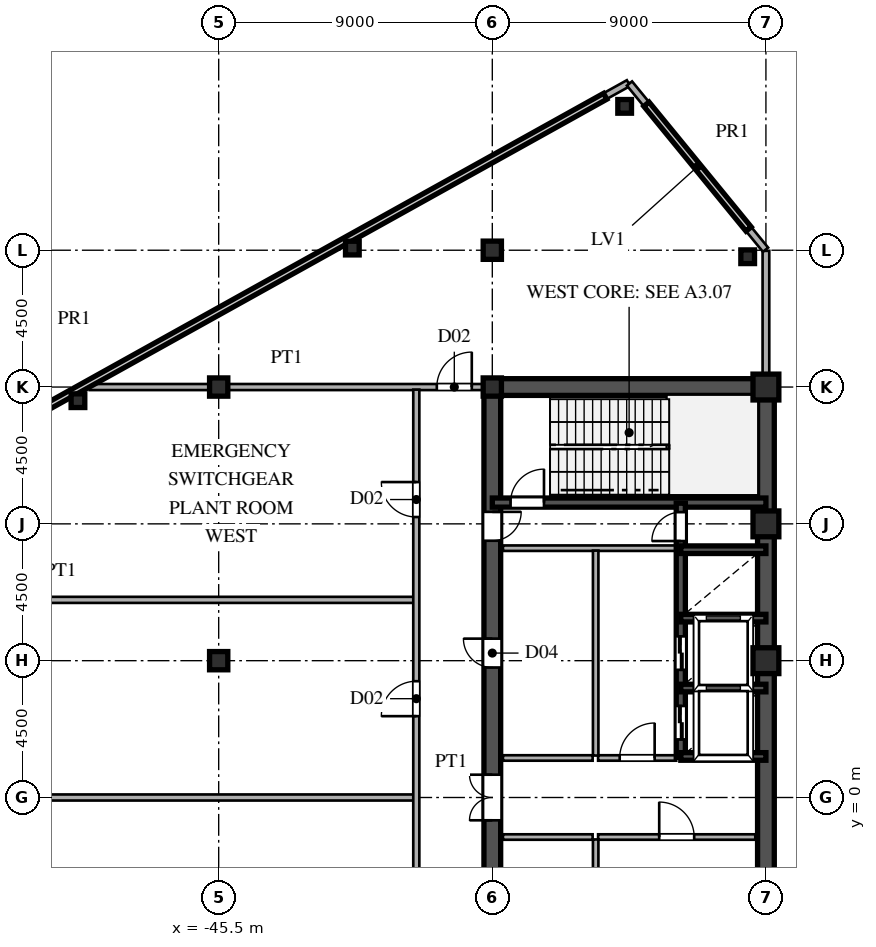
"""IFC4 building model, lengths in metres.
Left out: names, types, materials, properties, quantities, classifications, styles, units other than length and angle.
Written with IfcOpenShell. Run it as: python <this file> out.ifc"""

import sys

from ifc_helpers import new_model, si_unit, direction, frame, frame_2d, origin, origin_2d, place, context, subcontext, project, spatial, rectangle, hollow_rectangle, i_section, extrude, source, transform, mapped, element, fill, save


model = new_model("IFC4")
c1 = context("Model", 3, precision=1e-05, world=origin(), true_north=direction((0.0, 1.0)))
c2 = subcontext(c1, "Body", "Model", "MODEL_VIEW")
j1 = project(units=[si_unit("LENGTHUNIT", "METRE"), si_unit("PLANEANGLEUNIT", "RADIAN")], contexts=[c1])
p1 = place(None, origin())
s1 = spatial("IfcSite", under=j1, at=p1, CompositionType="ELEMENT")
p2 = place(p1, origin())
s2 = spatial("IfcBuilding", under=s1, at=p2, CompositionType="ELEMENT")
p3 = place(p2, frame((0.0, 0.0, 162.0)))
s3 = spatial("IfcBuildingStorey", under=s2, at=p3, CompositionType="ELEMENT", Elevation=162.0)
m1 = source(origin(), c2, "Body", "SweptSolid", [
    extrude(hollow_rectangle(XDim=0.85, YDim=0.85, WallThickness=0.036, at=origin_2d()), origin(), (0.0, 0.0, 1.0), 5.1),
])
for number, where, z_axis, x_axis in (
    (1, (-27.5, 4.5, 0.0), (0.0, 0.0, 1.0), (1.0, 0.0, 0.0)),
    (2, (-27.5, 9.0, 0.0), (0.0, 0.0, 1.0), (1.0, 0.0, 0.0)),
    (3, (-27.5, 13.5, 0.0), (0.0, 0.0, 1.0), (1.0, 0.0, 0.0)),
):
    element("IfcColumn", number, at=place(p3, frame(where, z_axis=z_axis, x_axis=x_axis)), inside=s3, PredefinedType="COLUMN", context=c2, shape_type="MappedRepresentation", body=[
        mapped(m1, transform((0.0, 0.0, 0.0), scale=1.0)),
    ])
m2 = source(origin(), c2, "Body", "SweptSolid", [
    extrude(i_section(OverallWidth=0.6, OverallDepth=0.6, WebThickness=0.025, FlangeThickness=0.04, at=origin_2d()), origin(), (0.0, 0.0, 1.0), 5.1),
])
for number, where, z_axis, x_axis in (
    (4, (-36.5, 13.5, 0.0), (0.0, 0.0, 1.0), (1.0, 0.0, 0.0)),
    (5, (-36.5, 18.0, 0.0), (0.0, 0.0, 1.0), (1.0, 0.0, 0.0)),
    (6, (-45.5, 4.5, 0.0), (0.0, 0.0, 1.0), (1.0, 0.0, 0.0)),
    (7, (-45.5, 13.5, 0.0), (0.0, 0.0, 1.0), (1.0, 0.0, 0.0)),
):
    element("IfcColumn", number, at=place(p3, frame(where, z_axis=z_axis, x_axis=x_axis)), inside=s3, PredefinedType="COLUMN", context=c2, shape_type="MappedRepresentation", body=[
        mapped(m2, transform((0.0, 0.0, 0.0), scale=1.0)),
    ])
m3 = source(origin(), c2, "Body", "SweptSolid", [
    extrude(hollow_rectangle(XDim=0.45, YDim=0.45, WallThickness=0.018, at=origin_2d()), origin(), (0.0, 0.0, 1.0), 5.1),
])
for number, where, z_axis, x_axis in (
    (8, (-28.1, 17.786, 0.0), (0.0, 0.0, 1.0), (1.0, 0.0, 0.0)),
    (9, (-32.147, 22.732, 0.0), (0.0, 0.0, 1.0), (1.0, 0.0, 0.0)),
    (10, (-41.104, 18.071, 0.0), (0.0, 0.0, 1.0), (1.0, 0.0, 0.0)),
    (11, (-50.129, 13.051, 0.0), (0.0, 0.0, 1.0), (1.0, 0.0, 0.0)),
):
    element("IfcColumn", number, at=place(p3, frame(where, z_axis=z_axis, x_axis=x_axis)), inside=s3, PredefinedType="COLUMN", context=c2, shape_type="MappedRepresentation", body=[
        mapped(m3, transform((0.0, 0.0, 0.0), scale=1.0)),
    ])
p4 = place(p3, frame((-27.5, 13.52, 0.0), z_axis=(0.0, 0.0, 1.0), x_axis=(0.0, 1.0, 0.0)))
e12 = element("IfcWall", 12, at=p4, inside=s3, PredefinedType="PARAPET", context=c2, shape_type="SweptSolid", body=[
    extrude(rectangle(XDim=4.46, YDim=0.22, at=frame_2d((2.23, 0.0))), origin(), (0.0, 0.0, 1.0), 1.25),
])
p5 = place(p3, frame((-27.513, 18.015, 0.0), z_axis=(0.0, 0.0, 1.0), x_axis=(-0.633218976113, 0.773972692213, 0.0)))
e13 = element("IfcWall", 13, at=p5, inside=s3, PredefinedType="PARAPET", context=c2, shape_type="SweptSolid", body=[
    extrude(rectangle(XDim=7.066, YDim=0.22, at=frame_2d((3.533, 0.0))), origin(), (0.0, 0.0, 1.0), 1.25),
])
p6 = place(p3, frame((-32.018, 23.49, 0.0), z_axis=(0.0, 0.0, 1.0), x_axis=(-0.873930586172, -0.486050748947, 0.0)))
e14 = element("IfcWall", 14, at=p6, inside=s3, PredefinedType="PARAPET", context=c2, shape_type="SweptSolid", body=[
    extrude(rectangle(XDim=41.725, YDim=0.22, at=frame_2d((20.863, 0.0))), origin(), (0.0, 0.0, 1.0), 1.25),
])
for number, where, z_axis, x_axis in (
    (15, (-27.5, -13.5, 0.0), (0.0, 0.0, 1.0), (0.0, 1.0, 0.0)),
    (16, (-27.5, 1.3, 0.0), (0.0, 0.0, 1.0), (0.0, 1.0, 0.0)),
):
    element("IfcWall", number, at=place(p3, frame(where, z_axis=z_axis, x_axis=x_axis)), inside=s3, PredefinedType="SHEAR", context=c2, shape_type="SweptSolid", body=[
        extrude(rectangle(XDim=12.2, YDim=0.55, at=frame_2d((6.1, 0.0))), origin(), (0.0, 0.0, 1.0), 4.88),
    ])
p7 = place(p3, frame((-27.5, -1.3, 0.0), z_axis=(0.0, 0.0, 1.0), x_axis=(0.0, 1.0, 0.0)))
e17 = element("IfcWall", 17, at=p7, inside=s3, PredefinedType="SHEAR", context=c2, shape_type="SweptSolid", body=[
    extrude(rectangle(XDim=2.6, YDim=0.55, at=frame_2d((1.3, 0.0))), origin(), (0.0, 0.0, 1.0), 4.88),
])
p8 = place(p3, frame((-36.5, 13.5, 0.0), z_axis=(0.0, 0.0, 1.0), x_axis=(1.0, 0.0, 0.0)))
e18 = element("IfcWall", 18, at=p8, inside=s3, PredefinedType="SHEAR", context=c2, shape_type="SweptSolid", body=[
    extrude(rectangle(XDim=9.0, YDim=0.55, at=frame_2d((4.5, 0.0))), origin(), (0.0, 0.0, 1.0), 4.88),
])
p9 = place(p3, frame((-36.5, -1.3, 0.0), z_axis=(0.0, 0.0, 1.0), x_axis=(0.0, 1.0, 0.0)))
e19 = element("IfcWall", 19, at=p9, inside=s3, PredefinedType="SHEAR", context=c2, shape_type="SweptSolid", body=[
    extrude(rectangle(XDim=2.6, YDim=0.55, at=frame_2d((1.3, 0.0))), origin(), (0.0, 0.0, 1.0), 4.88),
])
p10 = place(p9, frame((0.55, 0.0, 0.0)))
e20 = element("IfcOpeningElement", 20, at=p10, cuts=e19, PredefinedType="OPENING", context=c2, shape_type="SweptSolid", body=[
    extrude(rectangle(XDim=1.5, YDim=2.3, at=frame_2d((0.75, 1.15))), frame((0.0, 0.285, 0.0), z_axis=(0.0, -1.0, 0.0), x_axis=(1.0, 0.0, 0.0)), (0.0, 0.0, 1.0), 0.57),
])
p11 = place(p3, frame((-36.5, 8.2, 0.0), z_axis=(0.0, 0.0, 1.0), x_axis=(0.0, 1.0, 0.0)))
e21 = element("IfcWall", 21, at=p11, inside=s3, PredefinedType="SHEAR", context=c2, shape_type="SweptSolid", body=[
    extrude(rectangle(XDim=5.45, YDim=0.55, at=frame_2d((2.725, 0.0))), origin(), (0.0, 0.0, 1.0), 4.88),
])
p12 = place(p11, frame((0.245, 0.0, 0.0)))
e22 = element("IfcOpeningElement", 22, at=p12, cuts=e21, PredefinedType="OPENING", context=c2, shape_type="SweptSolid", body=[
    extrude(rectangle(XDim=0.95, YDim=2.15, at=frame_2d((0.475, 1.075))), frame((0.0, 0.285, 0.0), z_axis=(0.0, -1.0, 0.0), x_axis=(1.0, 0.0, 0.0)), (0.0, 0.0, 1.0), 0.57),
])
p13 = place(p3, frame((-36.5, -6.5, 0.0), z_axis=(0.0, 0.0, 1.0), x_axis=(0.0, 1.0, 0.0)))
e23 = element("IfcWall", 23, at=p13, inside=s3, PredefinedType="SHEAR", context=c2, shape_type="SweptSolid", body=[
    extrude(rectangle(XDim=5.2, YDim=0.55, at=frame_2d((2.6, 0.0))), origin(), (0.0, 0.0, 1.0), 4.88),
])
p14 = place(p13, frame((2.125, 0.0, 0.0)))
e24 = element("IfcOpeningElement", 24, at=p14, cuts=e23, PredefinedType="OPENING", context=c2, shape_type="SweptSolid", body=[
    extrude(rectangle(XDim=0.95, YDim=2.15, at=frame_2d((0.475, 1.075))), frame((0.0, 0.285, 0.0), z_axis=(0.0, -1.0, 0.0), x_axis=(1.0, 0.0, 0.0)), (0.0, 0.0, 1.0), 0.57),
])
p15 = place(p3, frame((-36.5, 1.3, 0.0), z_axis=(0.0, 0.0, 1.0), x_axis=(0.0, 1.0, 0.0)))
e25 = element("IfcWall", 25, at=p15, inside=s3, PredefinedType="SHEAR", context=c2, shape_type="SweptSolid", body=[
    extrude(rectangle(XDim=6.9, YDim=0.55, at=frame_2d((3.45, 0.0))), origin(), (0.0, 0.0, 1.0), 4.88),
])
p16 = place(p15, frame((2.975, 0.0, 0.0)))
e26 = element("IfcOpeningElement", 26, at=p16, cuts=e25, PredefinedType="OPENING", context=c2, shape_type="SweptSolid", body=[
    extrude(rectangle(XDim=0.95, YDim=2.15, at=frame_2d((0.475, 1.075))), frame((0.0, 0.285, 0.0), z_axis=(0.0, -1.0, 0.0), x_axis=(1.0, 0.0, 0.0)), (0.0, 0.0, 1.0), 0.57),
])
p17 = place(p3, frame((-36.5, 9.7, 0.0), z_axis=(0.0, 0.0, 1.0), x_axis=(1.0, 0.0, 0.0)))
e27 = element("IfcWall", 27, at=p17, inside=s3, PredefinedType="SHEAR", context=c2, shape_type="SweptSolid", body=[
    extrude(rectangle(XDim=9.0, YDim=0.3, at=frame_2d((4.5, 0.0))), origin(), (0.0, 0.0, 1.0), 4.88),
])
p18 = place(p17, frame((0.6, 0.0, 0.0)))
e28 = element("IfcOpeningElement", 28, at=p18, cuts=e27, PredefinedType="OPENING", context=c2, shape_type="SweptSolid", body=[
    extrude(rectangle(XDim=1.1, YDim=2.2, at=frame_2d((0.55, 1.1))), frame((0.0, 0.16, 0.0), z_axis=(0.0, -1.0, 0.0), x_axis=(1.0, 0.0, 0.0)), (0.0, 0.0, 1.0), 0.32),
])
for number, where, z_axis, x_axis in (
    (29, (-30.3, 1.35, 0.0), (0.0, 0.0, 1.0), (1.0, 0.0, 0.0)),
    (30, (-30.3, 3.6, 0.0), (0.0, 0.0, 1.0), (1.0, 0.0, 0.0)),
    (31, (-30.3, 5.9, 0.0), (0.0, 0.0, 1.0), (1.0, 0.0, 0.0)),
    (32, (-30.3, 8.15, 0.0), (0.0, 0.0, 1.0), (1.0, 0.0, 0.0)),
):
    element("IfcWall", number, at=place(p3, frame(where, z_axis=z_axis, x_axis=x_axis)), inside=s3, PredefinedType="SHEAR", context=c2, shape_type="SweptSolid", body=[
        extrude(rectangle(XDim=2.8, YDim=0.25, at=frame_2d((1.4, 0.0))), origin(), (0.0, 0.0, 1.0), 4.88),
    ])
p19 = place(p3, frame((-30.3, 1.32, 0.0), z_axis=(0.0, 0.0, 1.0), x_axis=(0.0, 1.0, 0.0)))
e33 = element("IfcWall", 33, at=p19, inside=s3, PredefinedType="SHEAR", context=c2, shape_type="SweptSolid", body=[
    extrude(rectangle(XDim=2.28, YDim=0.3, at=frame_2d((1.14, 0.0))), origin(), (0.0, 0.0, 1.0), 4.88),
])
p20 = place(p19, frame((0.59, 0.0, 0.0)))
e34 = element("IfcOpeningElement", 34, at=p20, cuts=e33, PredefinedType="OPENING", context=c2, shape_type="SweptSolid", body=[
    extrude(rectangle(XDim=1.1, YDim=2.2, at=frame_2d((0.55, 1.1))), frame((0.0, 0.16, 0.0), z_axis=(0.0, -1.0, 0.0), x_axis=(1.0, 0.0, 0.0)), (0.0, 0.0, 1.0), 0.32),
])
p21 = place(p3, frame((-30.3, 3.6, 0.0), z_axis=(0.0, 0.0, 1.0), x_axis=(0.0, 1.0, 0.0)))
e35 = element("IfcWall", 35, at=p21, inside=s3, PredefinedType="SHEAR", context=c2, shape_type="SweptSolid", body=[
    extrude(rectangle(XDim=2.3, YDim=0.3, at=frame_2d((1.15, 0.0))), origin(), (0.0, 0.0, 1.0), 4.88),
])
p22 = place(p21, frame((0.6, 0.0, 0.0)))
e36 = element("IfcOpeningElement", 36, at=p22, cuts=e35, PredefinedType="OPENING", context=c2, shape_type="SweptSolid", body=[
    extrude(rectangle(XDim=1.1, YDim=2.2, at=frame_2d((0.55, 1.1))), frame((0.0, 0.16, 0.0), z_axis=(0.0, -1.0, 0.0), x_axis=(1.0, 0.0, 0.0)), (0.0, 0.0, 1.0), 0.32),
])
p23 = place(p3, frame((-30.3, 5.9, 0.0), z_axis=(0.0, 0.0, 1.0), x_axis=(0.0, 1.0, 0.0)))
e37 = element("IfcWall", 37, at=p23, inside=s3, PredefinedType="SHEAR", context=c2, shape_type="SweptSolid", body=[
    extrude(rectangle(XDim=2.25, YDim=0.3, at=frame_2d((1.125, 0.0))), origin(), (0.0, 0.0, 1.0), 4.88),
])
p24 = place(p3, frame((-30.3, 8.15, 0.0), z_axis=(0.0, 0.0, 1.0), x_axis=(0.0, 1.0, 0.0)))
e38 = element("IfcWall", 38, at=p24, inside=s3, PredefinedType="SHEAR", context=c2, shape_type="SweptSolid", body=[
    extrude(rectangle(XDim=1.53, YDim=0.3, at=frame_2d((0.765, 0.0))), origin(), (0.0, 0.0, 1.0), 4.88),
])
p25 = place(p24, frame((0.285, 0.0, 0.0)))
e39 = element("IfcOpeningElement", 39, at=p25, cuts=e38, PredefinedType="OPENING", context=c2, shape_type="SweptSolid", body=[
    extrude(rectangle(XDim=0.95, YDim=2.15, at=frame_2d((0.475, 1.075))), frame((0.0, 0.16, 0.0), z_axis=(0.0, -1.0, 0.0), x_axis=(1.0, 0.0, 0.0)), (0.0, 0.0, 1.0), 0.32),
])
p26 = place(p3, frame((-36.15, 8.2, 0.0), z_axis=(0.0, 0.0, 1.0), x_axis=(1.0, 0.0, 0.0)))
e40 = element("IfcWall", 40, at=p26, inside=s3, PredefinedType="PARTITIONING", context=c2, shape_type="SweptSolid", body=[
    extrude(rectangle(XDim=5.7, YDim=0.18, at=frame_2d((2.85, 0.0))), origin(), (0.0, 0.0, 1.0), 4.88),
])
p27 = place(p3, frame((-33.1, -6.42, 0.0), z_axis=(0.0, 0.0, 1.0), x_axis=(0.0, 1.0, 0.0)))
e41 = element("IfcWall", 41, at=p27, inside=s3, PredefinedType="PARTITIONING", context=c2, shape_type="SweptSolid", body=[
    extrude(rectangle(XDim=5.04, YDim=0.18, at=frame_2d((2.52, 0.0))), origin(), (0.0, 0.0, 1.0), 4.88),
])
p28 = place(p3, frame((-33.1, 1.38, 0.0), z_axis=(0.0, 0.0, 1.0), x_axis=(0.0, 1.0, 0.0)))
e42 = element("IfcWall", 42, at=p28, inside=s3, PredefinedType="PARTITIONING", context=c2, shape_type="SweptSolid", body=[
    extrude(rectangle(XDim=6.74, YDim=0.18, at=frame_2d((3.37, 0.0))), origin(), (0.0, 0.0, 1.0), 4.88),
])
p29 = place(p3, frame((-33.02, -1.3, 0.0), z_axis=(0.0, 0.0, 1.0), x_axis=(1.0, 0.0, 0.0)))
e43 = element("IfcWall", 43, at=p29, inside=s3, PredefinedType="PARTITIONING", context=c2, shape_type="SweptSolid", body=[
    extrude(rectangle(XDim=5.17, YDim=0.18, at=frame_2d((2.585, 0.0))), origin(), (0.0, 0.0, 1.0), 4.88),
])
p30 = place(p29, frame((2.01, 0.0, 0.0)))
e44 = element("IfcOpeningElement", 44, at=p30, cuts=e43, PredefinedType="OPENING", context=c2, shape_type="SweptSolid", body=[
    extrude(rectangle(XDim=1.15, YDim=2.2, at=frame_2d((0.575, 1.1))), frame((0.0, 0.1, 0.0), z_axis=(0.0, -1.0, 0.0), x_axis=(1.0, 0.0, 0.0)), (0.0, 0.0, 1.0), 0.2),
])
p31 = place(p3, frame((-33.02, 1.3, 0.0), z_axis=(0.0, 0.0, 1.0), x_axis=(1.0, 0.0, 0.0)))
e45 = element("IfcWall", 45, at=p31, inside=s3, PredefinedType="PARTITIONING", context=c2, shape_type="SweptSolid", body=[
    extrude(rectangle(XDim=2.57, YDim=0.18, at=frame_2d((1.285, 0.0))), origin(), (0.0, 0.0, 1.0), 4.88),
])
p32 = place(p31, frame((0.71, 0.0, 0.0)))
e46 = element("IfcOpeningElement", 46, at=p32, cuts=e45, PredefinedType="OPENING", context=c2, shape_type="SweptSolid", body=[
    extrude(rectangle(XDim=1.15, YDim=2.2, at=frame_2d((0.575, 1.1))), frame((0.0, 0.1, 0.0), z_axis=(0.0, -1.0, 0.0), x_axis=(1.0, 0.0, 0.0)), (0.0, 0.0, 1.0), 0.2),
])
for number, where, z_axis, x_axis in (
    (47, (-36.15, -1.3, 0.0), (0.0, 0.0, 1.0), (1.0, 0.0, 0.0)),
    (48, (-36.15, 1.3, 0.0), (0.0, 0.0, 1.0), (1.0, 0.0, 0.0)),
):
    element("IfcWall", number, at=place(p3, frame(where, z_axis=z_axis, x_axis=x_axis)), inside=s3, PredefinedType="PARTITIONING", context=c2, shape_type="SweptSolid", body=[
        extrude(rectangle(XDim=2.95, YDim=0.18, at=frame_2d((1.475, 0.0))), origin(), (0.0, 0.0, 1.0), 4.88),
    ])
p33 = place(p3, frame((-68.385, 0.0, 0.0), z_axis=(0.0, 0.0, 1.0), x_axis=(1.0, 0.0, 0.0)))
e49 = element("IfcWall", 49, at=p33, inside=s3, PredefinedType="PARTITIONING", context=c2, shape_type="SweptSolid", body=[
    extrude(rectangle(XDim=29.3, YDim=0.2, at=frame_2d((14.65, 0.0))), origin(), (0.0, 0.0, 1.0), 4.88),
])
p34 = place(p3, frame((-62.33, 6.5, 0.0), z_axis=(0.0, 0.0, 1.0), x_axis=(1.0, 0.0, 0.0)))
e50 = element("IfcWall", 50, at=p34, inside=s3, PredefinedType="PARTITIONING", context=c2, shape_type="SweptSolid", body=[
    extrude(rectangle(XDim=23.245, YDim=0.2, at=frame_2d((11.623, 0.0))), origin(), (0.0, 0.0, 1.0), 4.88),
])
p35 = place(p3, frame((-49.744, 13.5, 0.0), z_axis=(0.0, 0.0, 1.0), x_axis=(1.0, 0.0, 0.0)))
e51 = element("IfcWall", 51, at=p35, inside=s3, PredefinedType="PARTITIONING", context=c2, shape_type="SweptSolid", body=[
    extrude(rectangle(XDim=2.156, YDim=0.2, at=frame_2d((1.078, 0.0))), origin(), (0.0, 0.0, 1.0), 4.88),
])
p36 = place(p3, frame((-47.587, 13.5, 0.0), z_axis=(0.0, 0.0, 1.0), x_axis=(1.0, 0.0, 0.0)))
e52 = element("IfcWall", 52, at=p36, inside=s3, PredefinedType="PARTITIONING", context=c2, shape_type="SweptSolid", body=[
    extrude(rectangle(XDim=10.807, YDim=0.2, at=frame_2d((5.404, 0.0))), origin(), (0.0, 0.0, 1.0), 4.28),
])
p37 = place(p36, frame((9.262, 0.0, 0.0)))
e53 = element("IfcOpeningElement", 53, at=p37, cuts=e52, PredefinedType="OPENING", context=c2, shape_type="SweptSolid", body=[
    extrude(rectangle(XDim=1.15, YDim=2.2, at=frame_2d((0.575, 1.1))), frame((0.0, 0.11, 0.0), z_axis=(0.0, -1.0, 0.0), x_axis=(1.0, 0.0, 0.0)), (0.0, 0.0, 1.0), 0.22),
])
p38 = place(p3, frame((-39.0, -13.415, 0.0), z_axis=(0.0, 0.0, 1.0), x_axis=(0.0, 1.0, 0.0)))
e54 = element("IfcWall", 54, at=p38, inside=s3, PredefinedType="PARTITIONING", context=c2, shape_type="SweptSolid", body=[
    extrude(rectangle(XDim=26.83, YDim=0.2, at=frame_2d((13.415, 0.0))), origin(), (0.0, 0.0, 1.0), 4.88),
])
p39 = place(p38, frame((3.29, 0.0, 0.0)))
e55 = element("IfcOpeningElement", 55, at=p39, cuts=e54, PredefinedType="OPENING", context=c2, shape_type="SweptSolid", body=[
    extrude(rectangle(XDim=1.15, YDim=2.2, at=frame_2d((0.575, 1.1))), frame((0.0, 0.11, 0.0), z_axis=(0.0, -1.0, 0.0), x_axis=(1.0, 0.0, 0.0)), (0.0, 0.0, 1.0), 0.22),
])
p40 = place(p38, frame((9.84, 0.0, 0.0)))
e56 = element("IfcOpeningElement", 56, at=p40, cuts=e54, PredefinedType="OPENING", context=c2, shape_type="SweptSolid", body=[
    extrude(rectangle(XDim=1.15, YDim=2.2, at=frame_2d((0.575, 1.1))), frame((0.0, 0.11, 0.0), z_axis=(0.0, -1.0, 0.0), x_axis=(1.0, 0.0, 0.0)), (0.0, 0.0, 1.0), 0.22),
])
p41 = place(p38, frame((16.09, 0.0, 0.0)))
e57 = element("IfcOpeningElement", 57, at=p41, cuts=e54, PredefinedType="OPENING", context=c2, shape_type="SweptSolid", body=[
    extrude(rectangle(XDim=1.15, YDim=2.2, at=frame_2d((0.575, 1.1))), frame((0.0, 0.11, 0.0), z_axis=(0.0, -1.0, 0.0), x_axis=(1.0, 0.0, 0.0)), (0.0, 0.0, 1.0), 0.22),
])
p42 = place(p38, frame((22.64, 0.0, 0.0)))
e58 = element("IfcOpeningElement", 58, at=p42, cuts=e54, PredefinedType="OPENING", context=c2, shape_type="SweptSolid", body=[
    extrude(rectangle(XDim=1.15, YDim=2.2, at=frame_2d((0.575, 1.1))), frame((0.0, 0.11, 0.0), z_axis=(0.0, -1.0, 0.0), x_axis=(1.0, 0.0, 0.0)), (0.0, 0.0, 1.0), 0.22),
])
m4 = source(origin(), c2, "Body", "SweptSolid", [
    extrude(rectangle(XDim=1.5, YDim=2.3, at=frame_2d((0.75, 1.15))), frame((0.0, 0.025, 0.0), z_axis=(0.0, -1.0, 0.0), x_axis=(1.0, 0.0, 0.0)), (0.0, 0.0, 1.0), 0.05),
])
p43 = place(p10, origin())
e59 = element("IfcDoor", 59, at=p43, inside=s3, OperationType="DOUBLE_SWING_LEFT", PredefinedType="DOOR", context=c2, shape_type="MappedRepresentation", body=[
    mapped(m4, transform((0.0, 0.0, 0.0), scale=1.0)),
])
fill(e20, e59)
m5 = source(origin(), c2, "Body", "SweptSolid", [
    extrude(rectangle(XDim=0.95, YDim=2.15, at=frame_2d((0.475, 1.075))), frame((0.0, 0.025, 0.0), z_axis=(0.0, -1.0, 0.0), x_axis=(1.0, 0.0, 0.0)), (0.0, 0.0, 1.0), 0.05),
])
p44 = place(p12, frame((0.95, 0.0, 0.0), z_axis=(0.0, 0.0, 1.0), x_axis=(-1.0, 0.0, 0.0)))
e60 = element("IfcDoor", 60, at=p44, inside=s3, OperationType="SINGLE_SWING_RIGHT", PredefinedType="DOOR", context=c2, shape_type="MappedRepresentation", body=[
    mapped(m5, transform((0.0, 0.0, 0.0), scale=1.0)),
])
fill(e22, e60)
p45 = place(p16, origin())
e61 = element("IfcDoor", 61, at=p45, inside=s3, OperationType="SINGLE_SWING_RIGHT", PredefinedType="DOOR", context=c2, shape_type="MappedRepresentation", body=[
    mapped(m5, transform((0.0, 0.0, 0.0), scale=1.0)),
])
fill(e26, e61)
m6 = source(origin(), c2, "Body", "SweptSolid", [
    extrude(rectangle(XDim=1.1, YDim=2.2, at=frame_2d((0.55, 1.1))), frame((0.0, 0.025, 0.0), z_axis=(0.0, -1.0, 0.0), x_axis=(1.0, 0.0, 0.0)), (0.0, 0.0, 1.0), 0.05),
])
p46 = place(p18, origin())
e62 = element("IfcDoor", 62, at=p46, inside=s3, OperationType="SINGLE_SWING_RIGHT", PredefinedType="DOOR", context=c2, shape_type="MappedRepresentation", body=[
    mapped(m6, transform((0.0, 0.0, 0.0), scale=1.0)),
])
fill(e28, e62)
m7 = source(origin(), c2, "Body", "SweptSolid", [
    extrude(rectangle(XDim=1.1, YDim=2.2, at=frame_2d((0.55, 1.1))), frame((0.0, 0.025, 0.0), z_axis=(0.0, -1.0, 0.0), x_axis=(1.0, 0.0, 0.0)), (0.0, 0.0, 1.0), 0.05),
])
p47 = place(p20, origin())
e63 = element("IfcDoor", 63, at=p47, inside=s3, OperationType="DOUBLE_DOOR_SLIDING", PredefinedType="DOOR", context=c2, shape_type="MappedRepresentation", body=[
    mapped(m7, transform((0.0, 0.0, 0.0), scale=1.0)),
])
fill(e34, e63)
p48 = place(p22, origin())
e64 = element("IfcDoor", 64, at=p48, inside=s3, OperationType="DOUBLE_DOOR_SLIDING", PredefinedType="DOOR", context=c2, shape_type="MappedRepresentation", body=[
    mapped(m7, transform((0.0, 0.0, 0.0), scale=1.0)),
])
fill(e36, e64)
p49 = place(p25, origin())
e65 = element("IfcDoor", 65, at=p49, inside=s3, OperationType="SINGLE_SWING_LEFT", PredefinedType="DOOR", context=c2, shape_type="MappedRepresentation", body=[
    mapped(m5, transform((0.0, 0.0, 0.0), scale=1.0)),
])
fill(e39, e65)
m8 = source(origin(), c2, "Body", "SweptSolid", [
    extrude(rectangle(XDim=1.15, YDim=2.2, at=frame_2d((0.575, 1.1))), frame((0.0, 0.025, 0.0), z_axis=(0.0, -1.0, 0.0), x_axis=(1.0, 0.0, 0.0)), (0.0, 0.0, 1.0), 0.05),
])
p50 = place(p30, origin())
e66 = element("IfcDoor", 66, at=p50, inside=s3, OperationType="SINGLE_SWING_LEFT", PredefinedType="DOOR", context=c2, shape_type="MappedRepresentation", body=[
    mapped(m8, transform((0.0, 0.0, 0.0), scale=1.0)),
])
fill(e44, e66)
p51 = place(p32, origin())
e67 = element("IfcDoor", 67, at=p51, inside=s3, OperationType="SINGLE_SWING_RIGHT", PredefinedType="DOOR", context=c2, shape_type="MappedRepresentation", body=[
    mapped(m8, transform((0.0, 0.0, 0.0), scale=1.0)),
])
fill(e46, e67)
p52 = place(p37, origin())
e68 = element("IfcDoor", 68, at=p52, inside=s3, OperationType="SINGLE_SWING_RIGHT", PredefinedType="DOOR", context=c2, shape_type="MappedRepresentation", body=[
    mapped(m8, transform((0.0, 0.0, 0.0), scale=1.0)),
])
fill(e53, e68)
p53 = place(p41, origin())
e69 = element("IfcDoor", 69, at=p53, inside=s3, OperationType="SINGLE_SWING_LEFT", PredefinedType="DOOR", context=c2, shape_type="MappedRepresentation", body=[
    mapped(m8, transform((0.0, 0.0, 0.0), scale=1.0)),
])
fill(e57, e69)
p54 = place(p42, origin())
e70 = element("IfcDoor", 70, at=p54, inside=s3, OperationType="SINGLE_SWING_RIGHT", PredefinedType="DOOR", context=c2, shape_type="MappedRepresentation", body=[
    mapped(m8, transform((0.0, 0.0, 0.0), scale=1.0)),
])
fill(e58, e70)
save(model, sys.argv[1])
